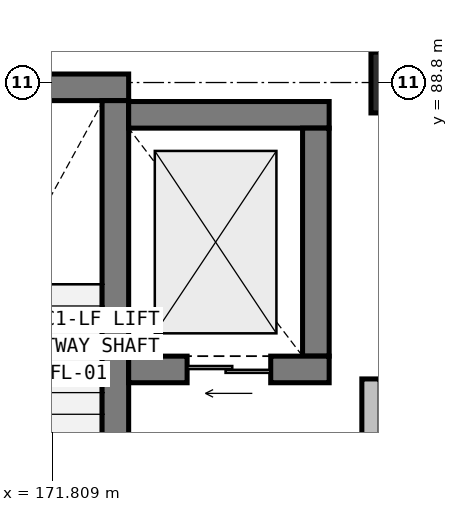
"""IFC4 building model, lengths in metres.
Left out: names, types, materials, properties, quantities, classifications, styles, units other than length and angle.
Written with IfcOpenShell. Run it as: python <this file> out.ifc"""

import sys

from ifc_helpers import new_model, si_unit, direction, frame, frame_2d, origin, origin_2d, place, context, subcontext, project, spatial, rectangle, extrude, element, fill, save


model = new_model("IFC4")
c1 = context("Model", 3, precision=1e-05, world=origin(), true_north=direction((0.0, 1.0)))
c2 = subcontext(c1, "Body", "Model", "MODEL_VIEW")
j1 = project(units=[si_unit("LENGTHUNIT", "METRE"), si_unit("PLANEANGLEUNIT", "RADIAN")], contexts=[c1])
p1 = place(None, origin())
s1 = spatial("IfcSite", under=j1, at=p1, CompositionType="ELEMENT")
p2 = place(p1, origin())
s2 = spatial("IfcBuilding", under=s1, at=p2, CompositionType="ELEMENT")
p3 = place(p2, origin())
s3 = spatial("IfcBuildingStorey", under=s2, at=p3, CompositionType="ELEMENT", Elevation=0.0)
p4 = place(p3, frame((176.4, 88.8, 0.0), z_axis=(0.0, 0.0, 1.0), x_axis=(1.0, 0.0, 0.0)))
e1 = element("IfcColumn", 1, at=p4, inside=s3, PredefinedType="COLUMN", context=c2, shape_type="SweptSolid", body=[
    extrude(rectangle(XDim=0.8, YDim=0.8, at=origin_2d()), origin(), (0.0, 0.0, 1.0), 6.0),
])
p5 = place(p3, frame((168.188, 88.737, 0.0), z_axis=(0.0, 0.0, 1.0), x_axis=(1.0, 0.0, 0.0)))
e2 = element("IfcWall", 2, at=p5, inside=s3, PredefinedType="SHEAR", context=c2, shape_type="SweptSolid", body=[
    extrude(rectangle(XDim=4.624, YDim=0.35, at=frame_2d((2.312, 0.0))), origin(), (0.0, 0.0, 1.0), 5.68),
])
p6 = place(p3, frame((172.637, 88.562, 0.0), z_axis=(0.0, 0.0, 1.0), x_axis=(0.0, -1.0, 0.0)))
e3 = element("IfcWall", 3, at=p6, inside=s3, PredefinedType="SHEAR", context=c2, shape_type="SweptSolid", body=[
    extrude(rectangle(XDim=9.124, YDim=0.35, at=frame_2d((4.562, 0.0))), origin(), (0.0, 0.0, 1.0), 5.68),
])
p7 = place(p3, frame((172.812, 88.375, 0.0), z_axis=(0.0, 0.0, 1.0), x_axis=(1.0, 0.0, 0.0)))
e4 = element("IfcWall", 4, at=p7, inside=s3, PredefinedType="SHEAR", context=c2, shape_type="SweptSolid", body=[
    extrude(rectangle(XDim=2.638, YDim=0.35, at=frame_2d((1.319, 0.0))), origin(), (0.0, 0.0, 1.0), 5.68),
])
p8 = place(p3, frame((175.275, 88.2, 0.0), z_axis=(0.0, 0.0, 1.0), x_axis=(0.0, -1.0, 0.0)))
e5 = element("IfcWall", 5, at=p8, inside=s3, PredefinedType="SHEAR", context=c2, shape_type="SweptSolid", body=[
    extrude(rectangle(XDim=3.0, YDim=0.35, at=frame_2d((1.5, 0.0))), origin(), (0.0, 0.0, 1.0), 5.68),
])
p9 = place(p3, frame((175.45, 85.025, 0.0), z_axis=(0.0, 0.0, 1.0), x_axis=(-1.0, 0.0, 0.0)))
e6 = element("IfcWall", 6, at=p9, inside=s3, PredefinedType="SHEAR", context=c2, shape_type="SweptSolid", body=[
    extrude(rectangle(XDim=2.638, YDim=0.35, at=frame_2d((1.319, 0.0))), origin(), (0.0, 0.0, 1.0), 5.68),
])
p10 = place(p9, frame((0.769, 0.0, 0.0)))
e7 = element("IfcOpeningElement", 7, at=p10, cuts=e6, PredefinedType="OPENING", context=c2, shape_type="SweptSolid", body=[
    extrude(rectangle(XDim=1.1, YDim=2.2, at=frame_2d((0.55, 1.1))), frame((0.0, 0.185, 0.0), z_axis=(0.0, -1.0, 0.0), x_axis=(1.0, 0.0, 0.0)), (0.0, 0.0, 1.0), 0.37),
])
p11 = place(p3, frame((176.0, 84.9, 0.0), z_axis=(0.0, 0.0, 1.0), x_axis=(0.0, -1.0, 0.0)))
e8 = element("IfcWall", 8, at=p11, inside=s3, PredefinedType="PARTITIONING", context=c2, shape_type="SweptSolid", body=[
    extrude(rectangle(XDim=5.5, YDim=0.24, at=frame_2d((2.75, 0.0))), origin(), (0.0, 0.0, 1.0), 5.005),
])
p12 = place(p10, origin())
e9 = element("IfcDoor", 9, at=p12, inside=s3, OperationType="DOUBLE_DOOR_SLIDING", PredefinedType="DOOR", context=c2, shape_type="SweptSolid", body=[
    extrude(rectangle(XDim=1.1, YDim=2.2, at=frame_2d((0.55, 1.1))), frame((0.0, 0.025, 0.0), z_axis=(0.0, -1.0, 0.0), x_axis=(1.0, 0.0, 0.0)), (0.0, 0.0, 1.0), 0.05),
])
fill(e7, e9)
save(model, sys.argv[1])
